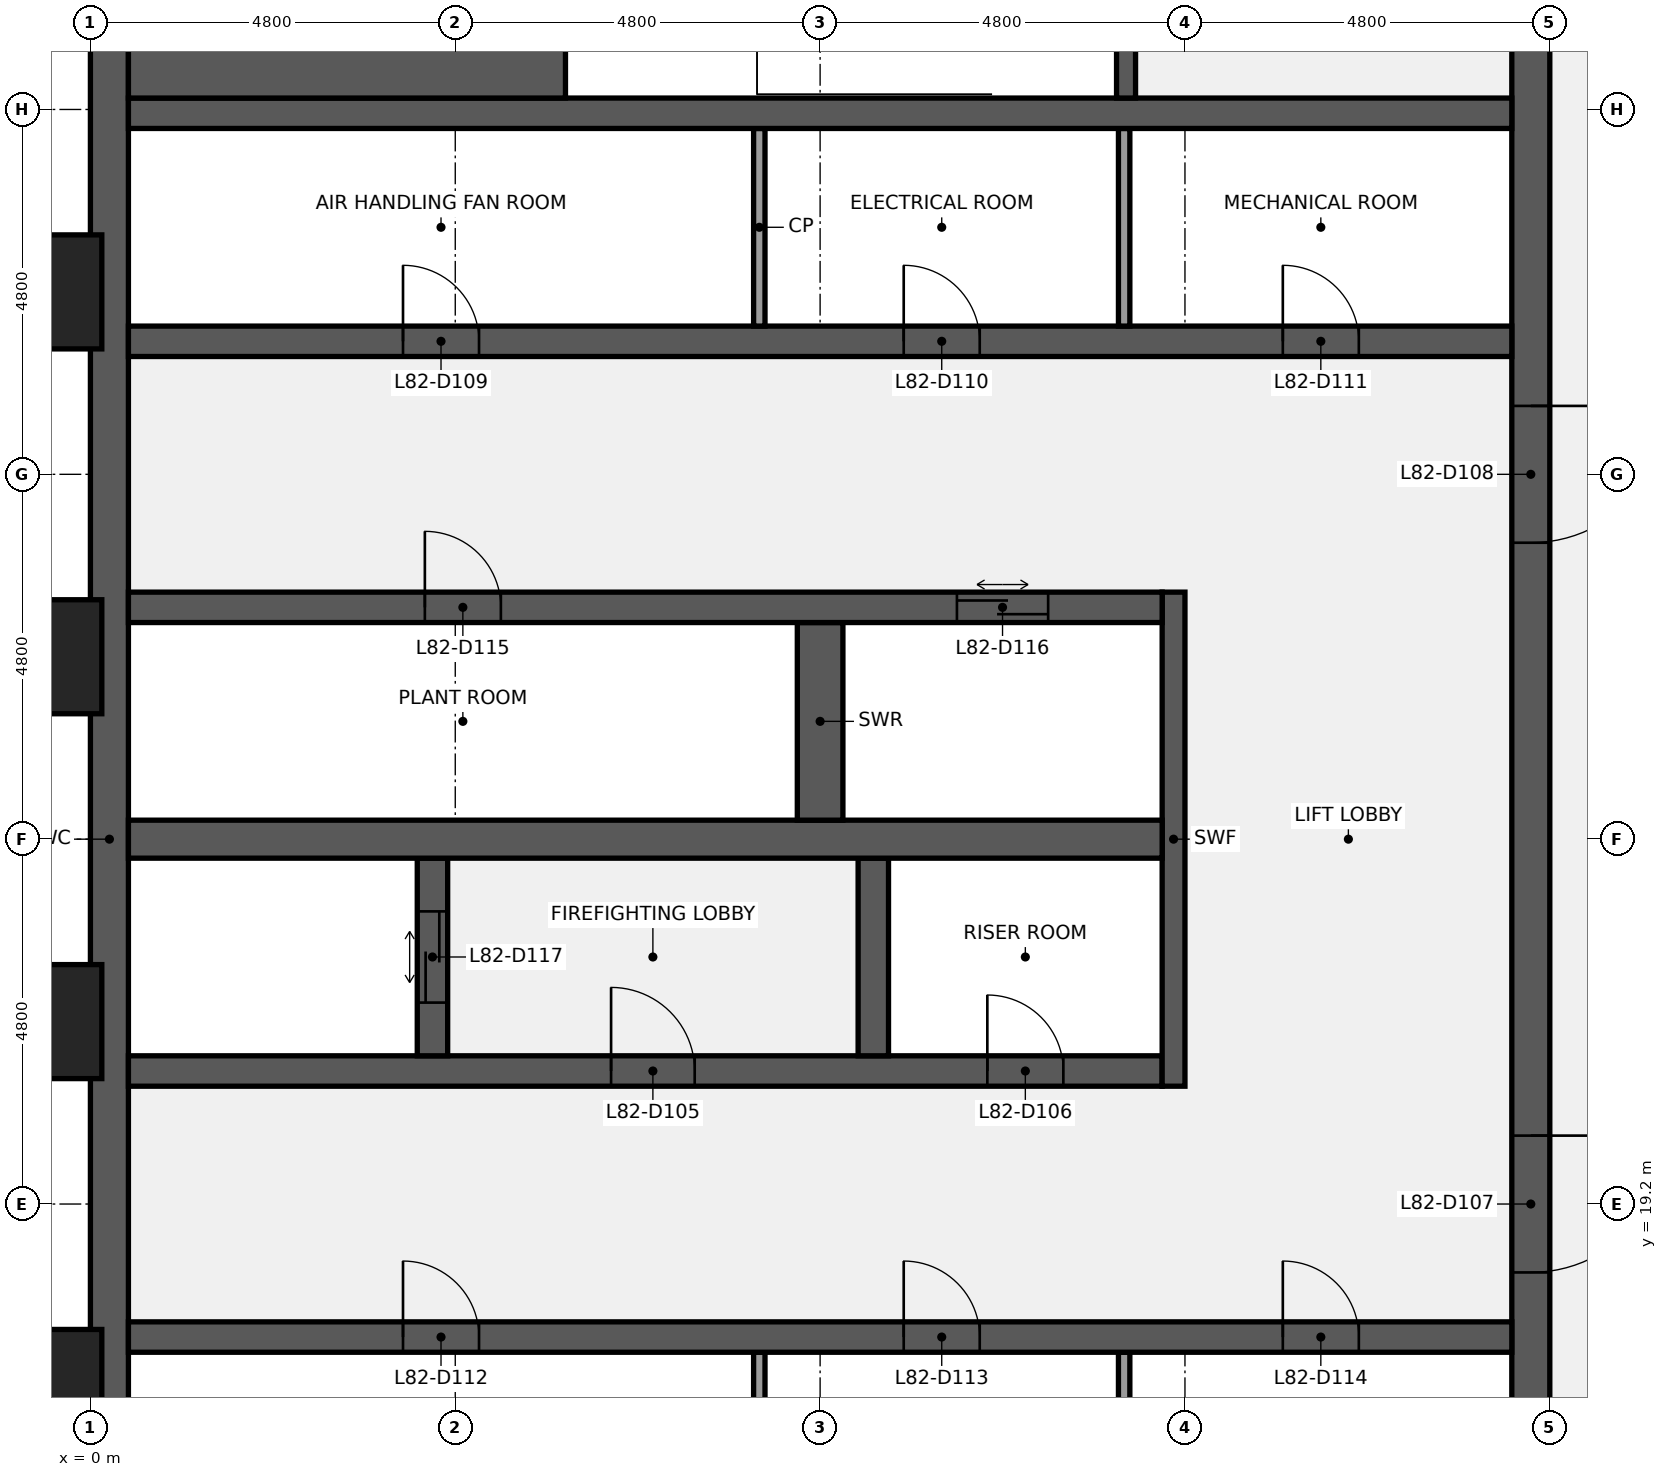
"""IFC4 building model, lengths in metres.
Left out: names, types, materials, properties, quantities, classifications, styles, units other than length and angle.
Written with IfcOpenShell. Run it as: python <this file> out.ifc"""

import sys

from ifc_helpers import new_model, si_unit, direction, frame, frame_2d, origin, origin_2d, place, context, subcontext, project, spatial, rectangle, extrude, element, fill, save


model = new_model("IFC4")
c1 = context("Model", 3, precision=1e-05, world=origin(), true_north=direction((0.0, 1.0)))
c2 = subcontext(c1, "Body", "Model", "MODEL_VIEW")
j1 = project(units=[si_unit("LENGTHUNIT", "METRE"), si_unit("PLANEANGLEUNIT", "RADIAN")], contexts=[c1])
p1 = place(None, origin())
s1 = spatial("IfcSite", under=j1, at=p1, CompositionType="ELEMENT")
p2 = place(p1, origin())
s2 = spatial("IfcBuilding", under=s1, at=p2, CompositionType="ELEMENT")
p3 = place(p2, frame((0.0, 0.0, 366.3)))
s3 = spatial("IfcBuildingStorey", under=s2, at=p3, CompositionType="ELEMENT", Elevation=366.3)
p4 = place(p3, frame((0.25, 9.6, 0.0), z_axis=(0.0, 0.0, 1.0), x_axis=(0.0, 1.0, 0.0)))
e1 = element("IfcWall", 1, at=p4, inside=s3, PredefinedType="SHEAR", context=c2, shape_type="SweptSolid", body=[
    extrude(rectangle(XDim=28.8, YDim=0.5, at=frame_2d((14.4, 0.0))), origin(), (0.0, 0.0, 1.0), 3.75),
])
p5 = place(p3, frame((18.95, 38.4, 0.0), z_axis=(0.0, 0.0, 1.0), x_axis=(0.0, -1.0, 0.0)))
e2 = element("IfcWall", 2, at=p5, inside=s3, PredefinedType="SHEAR", context=c2, shape_type="SweptSolid", body=[
    extrude(rectangle(XDim=28.8, YDim=0.5, at=frame_2d((14.4, 0.0))), origin(), (0.0, 0.0, 1.0), 3.75),
])
p6 = place(p5, frame((18.3, 0.0, 0.0)))
e3 = element("IfcOpeningElement", 3, at=p6, cuts=e2, PredefinedType="OPENING", context=c2, shape_type="SweptSolid", body=[
    extrude(rectangle(XDim=1.8, YDim=2.1, at=frame_2d((0.9, 1.05))), frame((0.0, 0.26, 0.0), z_axis=(0.0, -1.0, 0.0), x_axis=(1.0, 0.0, 0.0)), (0.0, 0.0, 1.0), 0.52),
])
p7 = place(p5, frame((8.7, 0.0, 0.0)))
e4 = element("IfcOpeningElement", 4, at=p7, cuts=e2, PredefinedType="OPENING", context=c2, shape_type="SweptSolid", body=[
    extrude(rectangle(XDim=1.8, YDim=2.1, at=frame_2d((0.9, 1.05))), frame((0.0, 0.26, 0.0), z_axis=(0.0, -1.0, 0.0), x_axis=(1.0, 0.0, 0.0)), (0.0, 0.0, 1.0), 0.52),
])
for number, where, z_axis, x_axis in (
    (5, (8.8, 14.65, 0.0), (0.0, 0.0, 1.0), (0.0, 1.0, 0.0)),
    (6, (13.6, 14.65, 0.0), (0.0, 0.0, 1.0), (0.0, 1.0, 0.0)),
):
    element("IfcWall", number, at=place(p3, frame(where, z_axis=z_axis, x_axis=x_axis)), inside=s3, PredefinedType="PARTITIONING", context=c2, shape_type="SweptSolid", body=[
        extrude(rectangle(XDim=2.6, YDim=0.15, at=frame_2d((1.3, 0.0))), origin(), (0.0, 0.0, 1.0), 3.75),
    ])
p8 = place(p3, frame((0.5, 17.45, 0.0), z_axis=(0.0, 0.0, 1.0), x_axis=(1.0, 0.0, 0.0)))
e7 = element("IfcWall", 7, at=p8, inside=s3, PredefinedType="SHEAR", context=c2, shape_type="SweptSolid", body=[
    extrude(rectangle(XDim=18.2, YDim=0.4, at=frame_2d((9.1, 0.0))), origin(), (0.0, 0.0, 1.0), 3.75),
])
p9 = place(p8, frame((3.613, 0.0, 0.0)))
e8 = element("IfcOpeningElement", 8, at=p9, cuts=e7, PredefinedType="OPENING", context=c2, shape_type="SweptSolid", body=[
    extrude(rectangle(XDim=1.0, YDim=2.1, at=frame_2d((0.5, 1.05))), frame((0.0, 0.21, 0.0), z_axis=(0.0, -1.0, 0.0), x_axis=(1.0, 0.0, 0.0)), (0.0, 0.0, 1.0), 0.42),
])
p10 = place(p8, frame((10.2, 0.0, 0.0)))
e9 = element("IfcOpeningElement", 9, at=p10, cuts=e7, PredefinedType="OPENING", context=c2, shape_type="SweptSolid", body=[
    extrude(rectangle(XDim=1.0, YDim=2.1, at=frame_2d((0.5, 1.05))), frame((0.0, 0.21, 0.0), z_axis=(0.0, -1.0, 0.0), x_axis=(1.0, 0.0, 0.0)), (0.0, 0.0, 1.0), 0.42),
])
p11 = place(p8, frame((15.188, 0.0, 0.0)))
e10 = element("IfcOpeningElement", 10, at=p11, cuts=e7, PredefinedType="OPENING", context=c2, shape_type="SweptSolid", body=[
    extrude(rectangle(XDim=1.0, YDim=2.1, at=frame_2d((0.5, 1.05))), frame((0.0, 0.21, 0.0), z_axis=(0.0, -1.0, 0.0), x_axis=(1.0, 0.0, 0.0)), (0.0, 0.0, 1.0), 0.42),
])
p12 = place(p3, frame((0.5, 20.95, 0.0), z_axis=(0.0, 0.0, 1.0), x_axis=(1.0, 0.0, 0.0)))
e11 = element("IfcWall", 11, at=p12, inside=s3, PredefinedType="SHEAR", context=c2, shape_type="SweptSolid", body=[
    extrude(rectangle(XDim=13.6, YDim=0.4, at=frame_2d((6.8, 0.0))), origin(), (0.0, 0.0, 1.0), 3.75),
])
p13 = place(p12, frame((6.35, 0.0, 0.0)))
e12 = element("IfcOpeningElement", 12, at=p13, cuts=e11, PredefinedType="OPENING", context=c2, shape_type="SweptSolid", body=[
    extrude(rectangle(XDim=1.1, YDim=2.1, at=frame_2d((0.55, 1.05))), frame((0.0, 0.21, 0.0), z_axis=(0.0, -1.0, 0.0), x_axis=(1.0, 0.0, 0.0)), (0.0, 0.0, 1.0), 0.42),
])
p14 = place(p12, frame((11.3, 0.0, 0.0)))
e13 = element("IfcOpeningElement", 13, at=p14, cuts=e11, PredefinedType="OPENING", context=c2, shape_type="SweptSolid", body=[
    extrude(rectangle(XDim=1.0, YDim=2.1, at=frame_2d((0.5, 1.05))), frame((0.0, 0.21, 0.0), z_axis=(0.0, -1.0, 0.0), x_axis=(1.0, 0.0, 0.0)), (0.0, 0.0, 1.0), 0.42),
])
p15 = place(p3, frame((14.25, 20.75, 0.0), z_axis=(0.0, 0.0, 1.0), x_axis=(0.0, 1.0, 0.0)))
e14 = element("IfcWall", 14, at=p15, inside=s3, PredefinedType="SHEAR", context=c2, shape_type="SweptSolid", body=[
    extrude(rectangle(XDim=6.5, YDim=0.3, at=frame_2d((3.25, 0.0))), origin(), (0.0, 0.0, 1.0), 3.75),
])
p16 = place(p3, frame((4.5, 21.15, 0.0), z_axis=(0.0, 0.0, 1.0), x_axis=(0.0, 1.0, 0.0)))
e15 = element("IfcWall", 15, at=p16, inside=s3, PredefinedType="SHEAR", context=c2, shape_type="SweptSolid", body=[
    extrude(rectangle(XDim=2.6, YDim=0.4, at=frame_2d((1.3, 0.0))), origin(), (0.0, 0.0, 1.0), 3.75),
])
p17 = place(p16, frame((0.7, 0.0, 0.0)))
e16 = element("IfcOpeningElement", 16, at=p17, cuts=e15, PredefinedType="OPENING", context=c2, shape_type="SweptSolid", body=[
    extrude(rectangle(XDim=1.2, YDim=2.1, at=frame_2d((0.6, 1.05))), frame((0.0, 0.21, 0.0), z_axis=(0.0, -1.0, 0.0), x_axis=(1.0, 0.0, 0.0)), (0.0, 0.0, 1.0), 0.42),
])
p18 = place(p3, frame((10.3, 21.15, 0.0), z_axis=(0.0, 0.0, 1.0), x_axis=(0.0, 1.0, 0.0)))
e17 = element("IfcWall", 17, at=p18, inside=s3, PredefinedType="SHEAR", context=c2, shape_type="SweptSolid", body=[
    extrude(rectangle(XDim=2.6, YDim=0.4, at=frame_2d((1.3, 0.0))), origin(), (0.0, 0.0, 1.0), 3.75),
])
p19 = place(p3, frame((0.5, 24.0, 0.0), z_axis=(0.0, 0.0, 1.0), x_axis=(1.0, 0.0, 0.0)))
e18 = element("IfcWall", 18, at=p19, inside=s3, PredefinedType="SHEAR", context=c2, shape_type="SweptSolid", body=[
    extrude(rectangle(XDim=13.6, YDim=0.5, at=frame_2d((6.8, 0.0))), origin(), (0.0, 0.0, 1.0), 3.75),
])
p20 = place(p3, frame((9.6, 24.25, 0.0), z_axis=(0.0, 0.0, 1.0), x_axis=(0.0, 1.0, 0.0)))
e19 = element("IfcWall", 19, at=p20, inside=s3, PredefinedType="SHEAR", context=c2, shape_type="SweptSolid", body=[
    extrude(rectangle(XDim=2.6, YDim=0.6, at=frame_2d((1.3, 0.0))), origin(), (0.0, 0.0, 1.0), 3.75),
])
p21 = place(p3, frame((0.5, 27.05, 0.0), z_axis=(0.0, 0.0, 1.0), x_axis=(1.0, 0.0, 0.0)))
e20 = element("IfcWall", 20, at=p21, inside=s3, PredefinedType="SHEAR", context=c2, shape_type="SweptSolid", body=[
    extrude(rectangle(XDim=13.6, YDim=0.4, at=frame_2d((6.8, 0.0))), origin(), (0.0, 0.0, 1.0), 3.75),
])
p22 = place(p21, frame((3.9, 0.0, 0.0)))
e21 = element("IfcOpeningElement", 21, at=p22, cuts=e20, PredefinedType="OPENING", context=c2, shape_type="SweptSolid", body=[
    extrude(rectangle(XDim=1.0, YDim=2.1, at=frame_2d((0.5, 1.05))), frame((0.0, 0.21, 0.0), z_axis=(0.0, -1.0, 0.0), x_axis=(1.0, 0.0, 0.0)), (0.0, 0.0, 1.0), 0.42),
])
p23 = place(p21, frame((10.9, 0.0, 0.0)))
e22 = element("IfcOpeningElement", 22, at=p23, cuts=e20, PredefinedType="OPENING", context=c2, shape_type="SweptSolid", body=[
    extrude(rectangle(XDim=1.2, YDim=2.1, at=frame_2d((0.6, 1.05))), frame((0.0, 0.21, 0.0), z_axis=(0.0, -1.0, 0.0), x_axis=(1.0, 0.0, 0.0)), (0.0, 0.0, 1.0), 0.42),
])
p24 = place(p3, frame((0.5, 30.55, 0.0), z_axis=(0.0, 0.0, 1.0), x_axis=(1.0, 0.0, 0.0)))
e23 = element("IfcWall", 23, at=p24, inside=s3, PredefinedType="SHEAR", context=c2, shape_type="SweptSolid", body=[
    extrude(rectangle(XDim=18.2, YDim=0.4, at=frame_2d((9.1, 0.0))), origin(), (0.0, 0.0, 1.0), 3.75),
])
p25 = place(p24, frame((3.613, 0.0, 0.0)))
e24 = element("IfcOpeningElement", 24, at=p25, cuts=e23, PredefinedType="OPENING", context=c2, shape_type="SweptSolid", body=[
    extrude(rectangle(XDim=1.0, YDim=2.1, at=frame_2d((0.5, 1.05))), frame((0.0, 0.21, 0.0), z_axis=(0.0, -1.0, 0.0), x_axis=(1.0, 0.0, 0.0)), (0.0, 0.0, 1.0), 0.42),
])
p26 = place(p24, frame((10.2, 0.0, 0.0)))
e25 = element("IfcOpeningElement", 25, at=p26, cuts=e23, PredefinedType="OPENING", context=c2, shape_type="SweptSolid", body=[
    extrude(rectangle(XDim=1.0, YDim=2.1, at=frame_2d((0.5, 1.05))), frame((0.0, 0.21, 0.0), z_axis=(0.0, -1.0, 0.0), x_axis=(1.0, 0.0, 0.0)), (0.0, 0.0, 1.0), 0.42),
])
p27 = place(p24, frame((15.188, 0.0, 0.0)))
e26 = element("IfcOpeningElement", 26, at=p27, cuts=e23, PredefinedType="OPENING", context=c2, shape_type="SweptSolid", body=[
    extrude(rectangle(XDim=1.0, YDim=2.1, at=frame_2d((0.5, 1.05))), frame((0.0, 0.21, 0.0), z_axis=(0.0, -1.0, 0.0), x_axis=(1.0, 0.0, 0.0)), (0.0, 0.0, 1.0), 0.42),
])
for number, where, z_axis, x_axis in (
    (27, (8.8, 30.75, 0.0), (0.0, 0.0, 1.0), (0.0, 1.0, 0.0)),
    (28, (13.6, 30.75, 0.0), (0.0, 0.0, 1.0), (0.0, 1.0, 0.0)),
):
    element("IfcWall", number, at=place(p3, frame(where, z_axis=z_axis, x_axis=x_axis)), inside=s3, PredefinedType="PARTITIONING", context=c2, shape_type="SweptSolid", body=[
        extrude(rectangle(XDim=2.6, YDim=0.15, at=frame_2d((1.3, 0.0))), origin(), (0.0, 0.0, 1.0), 3.75),
    ])
p28 = place(p3, frame((0.5, 33.55, 0.0), z_axis=(0.0, 0.0, 1.0), x_axis=(1.0, 0.0, 0.0)))
e29 = element("IfcWall", 29, at=p28, inside=s3, PredefinedType="SHEAR", context=c2, shape_type="SweptSolid", body=[
    extrude(rectangle(XDim=18.2, YDim=0.4, at=frame_2d((9.1, 0.0))), origin(), (0.0, 0.0, 1.0), 3.75),
])
p29 = place(p3, frame((0.5, 35.825, 0.0), z_axis=(0.0, 0.0, 1.0), x_axis=(1.0, 0.0, 0.0)))
e30 = element("IfcWall", 30, at=p29, inside=s3, PredefinedType="SHEAR", context=c2, shape_type="SweptSolid", body=[
    extrude(rectangle(XDim=5.75, YDim=4.15, at=frame_2d((2.875, 0.0))), origin(), (0.0, 0.0, 1.0), 3.75),
])
p30 = place(p3, frame((13.625, 33.75, 0.0), z_axis=(0.0, 0.0, 1.0), x_axis=(0.0, 1.0, 0.0)))
e31 = element("IfcWall", 31, at=p30, inside=s3, PredefinedType="SHEAR", context=c2, shape_type="SweptSolid", body=[
    extrude(rectangle(XDim=3.45, YDim=0.25, at=frame_2d((1.725, 0.0))), origin(), (0.0, 0.0, 1.0), 3.75),
])
p31 = place(p30, frame((1.175, 0.0, 0.0)))
e32 = element("IfcOpeningElement", 32, at=p31, cuts=e31, PredefinedType="OPENING", context=c2, shape_type="SweptSolid", body=[
    extrude(rectangle(XDim=1.1, YDim=2.1, at=frame_2d((0.55, 1.05))), frame((0.0, 0.135, 0.0), z_axis=(0.0, -1.0, 0.0), x_axis=(1.0, 0.0, 0.0)), (0.0, 0.0, 1.0), 0.27),
])
for number, where, z_axis, x_axis in (
    (33, (-0.75, 16.8, 0.0), (0.0, 0.0, 1.0), (0.0, 1.0, 0.0)),
    (34, (-0.75, 21.6, 0.0), (0.0, 0.0, 1.0), (0.0, 1.0, 0.0)),
    (35, (-0.75, 26.4, 0.0), (0.0, 0.0, 1.0), (0.0, 1.0, 0.0)),
    (36, (-0.75, 31.2, 0.0), (0.0, 0.0, 1.0), (0.0, 1.0, 0.0)),
):
    element("IfcColumn", number, at=place(p3, frame(where, z_axis=z_axis, x_axis=x_axis)), inside=s3, PredefinedType="PILASTER", context=c2, shape_type="SweptSolid", body=[
        extrude(rectangle(XDim=1.8, YDim=1.5, at=origin_2d()), origin(), (0.0, 0.0, 1.0), 4.0),
    ])
p32 = place(p13, origin())
e37 = element("IfcDoor", 37, at=p32, inside=s3, OperationType="SINGLE_SWING_LEFT", PredefinedType="DOOR", context=c2, shape_type="SweptSolid", body=[
    extrude(rectangle(XDim=1.1, YDim=2.1, at=frame_2d((0.55, 1.05))), frame((0.0, 0.025, 0.0), z_axis=(0.0, -1.0, 0.0), x_axis=(1.0, 0.0, 0.0)), (0.0, 0.0, 1.0), 0.05),
])
fill(e12, e37)
p33 = place(p14, origin())
e38 = element("IfcDoor", 38, at=p33, inside=s3, OperationType="SINGLE_SWING_LEFT", PredefinedType="DOOR", context=c2, shape_type="SweptSolid", body=[
    extrude(rectangle(XDim=1.0, YDim=2.1, at=frame_2d((0.5, 1.05))), frame((0.0, 0.025, 0.0), z_axis=(0.0, -1.0, 0.0), x_axis=(1.0, 0.0, 0.0)), (0.0, 0.0, 1.0), 0.05),
])
fill(e13, e38)
p34 = place(p6, origin())
e39 = element("IfcDoor", 39, at=p34, inside=s3, OperationType="DOUBLE_DOOR_SINGLE_SWING", PredefinedType="DOOR", context=c2, shape_type="SweptSolid", body=[
    extrude(rectangle(XDim=1.8, YDim=2.1, at=frame_2d((0.9, 1.05))), frame((0.0, 0.025, 0.0), z_axis=(0.0, -1.0, 0.0), x_axis=(1.0, 0.0, 0.0)), (0.0, 0.0, 1.0), 0.05),
])
fill(e3, e39)
p35 = place(p7, origin())
e40 = element("IfcDoor", 40, at=p35, inside=s3, OperationType="DOUBLE_DOOR_SINGLE_SWING", PredefinedType="DOOR", context=c2, shape_type="SweptSolid", body=[
    extrude(rectangle(XDim=1.8, YDim=2.1, at=frame_2d((0.9, 1.05))), frame((0.0, 0.025, 0.0), z_axis=(0.0, -1.0, 0.0), x_axis=(1.0, 0.0, 0.0)), (0.0, 0.0, 1.0), 0.05),
])
fill(e4, e40)
p36 = place(p25, origin())
e41 = element("IfcDoor", 41, at=p36, inside=s3, OperationType="SINGLE_SWING_LEFT", PredefinedType="DOOR", context=c2, shape_type="SweptSolid", body=[
    extrude(rectangle(XDim=1.0, YDim=2.1, at=frame_2d((0.5, 1.05))), frame((0.0, 0.025, 0.0), z_axis=(0.0, -1.0, 0.0), x_axis=(1.0, 0.0, 0.0)), (0.0, 0.0, 1.0), 0.05),
])
fill(e24, e41)
p37 = place(p26, origin())
e42 = element("IfcDoor", 42, at=p37, inside=s3, OperationType="SINGLE_SWING_LEFT", PredefinedType="DOOR", context=c2, shape_type="SweptSolid", body=[
    extrude(rectangle(XDim=1.0, YDim=2.1, at=frame_2d((0.5, 1.05))), frame((0.0, 0.025, 0.0), z_axis=(0.0, -1.0, 0.0), x_axis=(1.0, 0.0, 0.0)), (0.0, 0.0, 1.0), 0.05),
])
fill(e25, e42)
p38 = place(p27, origin())
e43 = element("IfcDoor", 43, at=p38, inside=s3, OperationType="SINGLE_SWING_LEFT", PredefinedType="DOOR", context=c2, shape_type="SweptSolid", body=[
    extrude(rectangle(XDim=1.0, YDim=2.1, at=frame_2d((0.5, 1.05))), frame((0.0, 0.025, 0.0), z_axis=(0.0, -1.0, 0.0), x_axis=(1.0, 0.0, 0.0)), (0.0, 0.0, 1.0), 0.05),
])
fill(e26, e43)
p39 = place(p9, origin())
e44 = element("IfcDoor", 44, at=p39, inside=s3, OperationType="SINGLE_SWING_LEFT", PredefinedType="DOOR", context=c2, shape_type="SweptSolid", body=[
    extrude(rectangle(XDim=1.0, YDim=2.1, at=frame_2d((0.5, 1.05))), frame((0.0, 0.025, 0.0), z_axis=(0.0, -1.0, 0.0), x_axis=(1.0, 0.0, 0.0)), (0.0, 0.0, 1.0), 0.05),
])
fill(e8, e44)
p40 = place(p10, origin())
e45 = element("IfcDoor", 45, at=p40, inside=s3, OperationType="SINGLE_SWING_LEFT", PredefinedType="DOOR", context=c2, shape_type="SweptSolid", body=[
    extrude(rectangle(XDim=1.0, YDim=2.1, at=frame_2d((0.5, 1.05))), frame((0.0, 0.025, 0.0), z_axis=(0.0, -1.0, 0.0), x_axis=(1.0, 0.0, 0.0)), (0.0, 0.0, 1.0), 0.05),
])
fill(e9, e45)
p41 = place(p11, origin())
e46 = element("IfcDoor", 46, at=p41, inside=s3, OperationType="SINGLE_SWING_LEFT", PredefinedType="DOOR", context=c2, shape_type="SweptSolid", body=[
    extrude(rectangle(XDim=1.0, YDim=2.1, at=frame_2d((0.5, 1.05))), frame((0.0, 0.025, 0.0), z_axis=(0.0, -1.0, 0.0), x_axis=(1.0, 0.0, 0.0)), (0.0, 0.0, 1.0), 0.05),
])
fill(e10, e46)
p42 = place(p22, origin())
e47 = element("IfcDoor", 47, at=p42, inside=s3, OperationType="SINGLE_SWING_LEFT", PredefinedType="DOOR", context=c2, shape_type="SweptSolid", body=[
    extrude(rectangle(XDim=1.0, YDim=2.1, at=frame_2d((0.5, 1.05))), frame((0.0, 0.025, 0.0), z_axis=(0.0, -1.0, 0.0), x_axis=(1.0, 0.0, 0.0)), (0.0, 0.0, 1.0), 0.05),
])
fill(e21, e47)
p43 = place(p23, origin())
e48 = element("IfcDoor", 48, at=p43, inside=s3, OperationType="DOUBLE_DOOR_SLIDING", PredefinedType="DOOR", context=c2, shape_type="SweptSolid", body=[
    extrude(rectangle(XDim=1.2, YDim=2.1, at=frame_2d((0.6, 1.05))), frame((0.0, 0.025, 0.0), z_axis=(0.0, -1.0, 0.0), x_axis=(1.0, 0.0, 0.0)), (0.0, 0.0, 1.0), 0.05),
])
fill(e22, e48)
p44 = place(p17, origin())
e49 = element("IfcDoor", 49, at=p44, inside=s3, OperationType="DOUBLE_DOOR_SLIDING", PredefinedType="DOOR", context=c2, shape_type="SweptSolid", body=[
    extrude(rectangle(XDim=1.2, YDim=2.1, at=frame_2d((0.6, 1.05))), frame((0.0, 0.025, 0.0), z_axis=(0.0, -1.0, 0.0), x_axis=(1.0, 0.0, 0.0)), (0.0, 0.0, 1.0), 0.05),
])
fill(e16, e49)
save(model, sys.argv[1])
